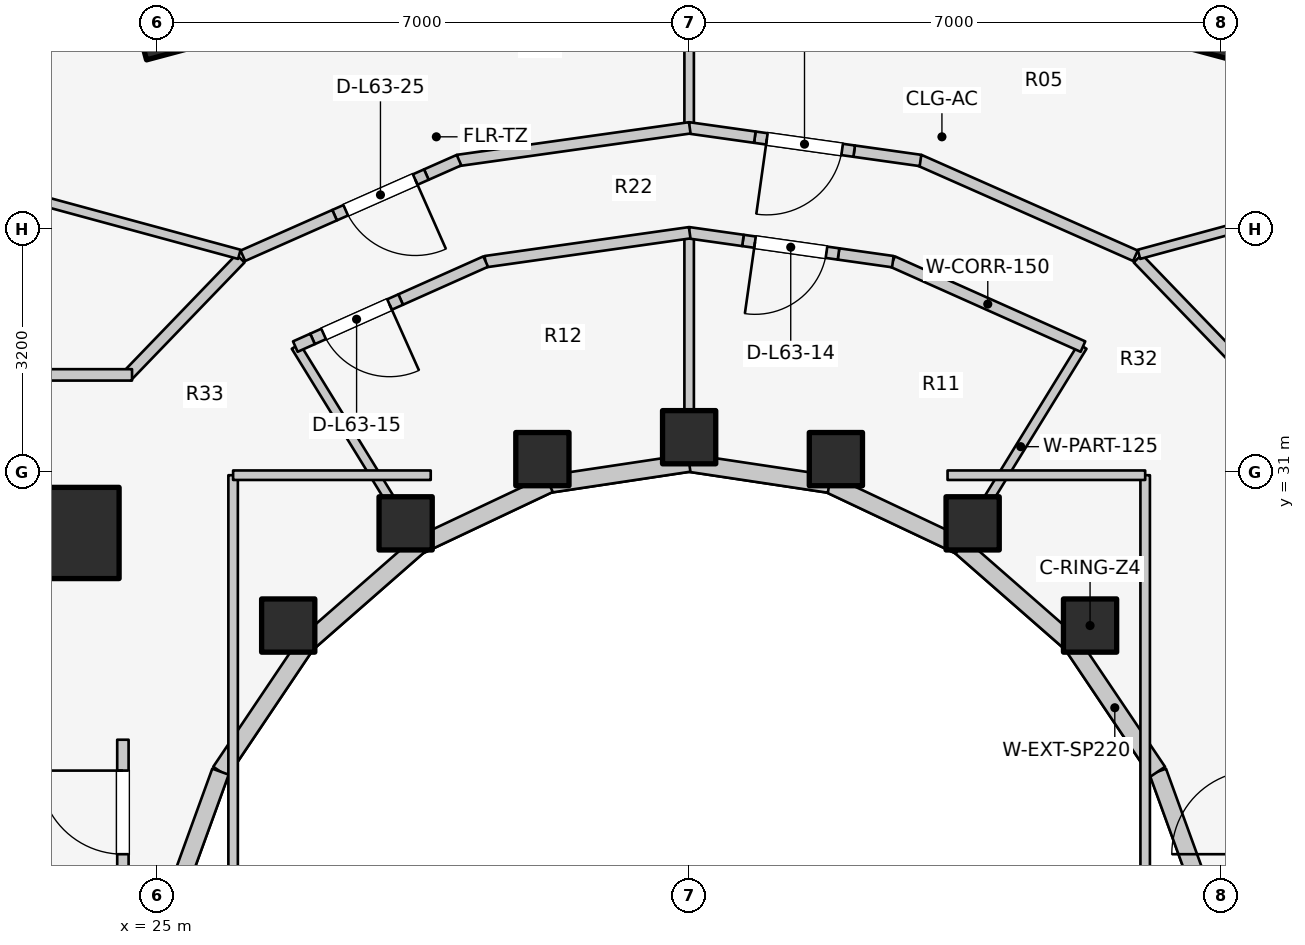
"""IFC4 building model, lengths in metres.
Left out: names, types, materials, properties, quantities, classifications, styles, units other than length and angle.
Written with IfcOpenShell. Run it as: python <this file> out.ifc"""

import sys

from ifc_helpers import new_model, si_unit, direction, frame, frame_2d, origin, origin_2d, place, context, subcontext, project, spatial, rectangle, extrude, element, fill, save


model = new_model("IFC4")
c1 = context("Model", 3, precision=1e-05, world=origin(), true_north=direction((0.0, 1.0)))
c2 = subcontext(c1, "Body", "Model", "MODEL_VIEW")
j1 = project(units=[si_unit("LENGTHUNIT", "METRE"), si_unit("PLANEANGLEUNIT", "RADIAN")], contexts=[c1])
p1 = place(None, origin())
s1 = spatial("IfcSite", under=j1, at=p1, CompositionType="ELEMENT")
p2 = place(p1, origin())
s2 = spatial("IfcBuilding", under=s1, at=p2, CompositionType="ELEMENT")
p3 = place(p2, frame((0.0, 0.0, 207.8)))
s3 = spatial("IfcBuildingStorey", under=s2, at=p3, CompositionType="ELEMENT", Elevation=207.8)
p4 = place(p3, frame((19.65, 30.35, 0.0), z_axis=(0.0, 0.0, 1.0), x_axis=(1.0, 0.0, 0.0)))
e1 = element("IfcWall", 1, at=p4, inside=s3, PredefinedType="SHEAR", context=c2, shape_type="SweptSolid", body=[
    extrude(rectangle(XDim=4.5, YDim=0.55, at=frame_2d((2.25, 0.0))), origin(), (0.0, 0.0, 1.0), 3.1),
])
p5 = place(p3, frame((23.9, 30.2, 0.0), z_axis=(0.0, 0.0, 1.0), x_axis=(1.0, 0.0, 0.0)))
e2 = element("IfcColumn", 2, at=p5, inside=s3, PredefinedType="COLUMN", context=c2, shape_type="SweptSolid", body=[
    extrude(rectangle(XDim=1.2, YDim=1.2, at=origin_2d()), origin(), (0.0, 0.0, 1.0), 3.1),
])
for number, where, z_axis, x_axis in (
    (3, (37.275, 28.982, 0.0), (0.0, 0.0, 1.0), (1.0, 0.0, 0.0)),
    (4, (35.73, 30.327, 0.0), (0.0, 0.0, 1.0), (1.0, 0.0, 0.0)),
    (5, (33.931, 31.172, 0.0), (0.0, 0.0, 1.0), (1.0, 0.0, 0.0)),
):
    element("IfcColumn", number, at=place(p3, frame(where, z_axis=z_axis, x_axis=x_axis)), inside=s3, PredefinedType="COLUMN", context=c2, shape_type="SweptSolid", body=[
        extrude(rectangle(XDim=0.7, YDim=0.7, at=origin_2d()), origin(), (0.0, 0.0, 1.0), 3.1),
    ])
p6 = place(p3, frame((38.856, 36.914, 0.0), z_axis=(0.0, 0.0, 1.0), x_axis=(0.258819045103, 0.965925826289, 0.0)))
e6 = element("IfcColumn", 6, at=p6, inside=s3, PredefinedType="COLUMN", context=c2, shape_type="SweptSolid", body=[
    extrude(rectangle(XDim=0.8, YDim=0.8, at=origin_2d()), origin(), (0.0, 0.0, 1.0), 3.1),
])
for number, where, z_axis, x_axis in (
    (7, (32.0, 31.46, 0.0), (0.0, 0.0, 1.0), (1.0, 0.0, 0.0)),
    (8, (30.069, 31.172, 0.0), (0.0, 0.0, 1.0), (1.0, 0.0, 0.0)),
):
    element("IfcColumn", number, at=place(p3, frame(where, z_axis=z_axis, x_axis=x_axis)), inside=s3, PredefinedType="COLUMN", context=c2, shape_type="SweptSolid", body=[
        extrude(rectangle(XDim=0.7, YDim=0.7, at=origin_2d()), origin(), (0.0, 0.0, 1.0), 3.1),
    ])
p7 = place(p3, frame((25.144, 36.914, 0.0), z_axis=(0.0, 0.0, 1.0), x_axis=(-0.258819045103, 0.965925826289, 0.0)))
e9 = element("IfcColumn", 9, at=p7, inside=s3, PredefinedType="COLUMN", context=c2, shape_type="SweptSolid", body=[
    extrude(rectangle(XDim=0.8, YDim=0.8, at=origin_2d()), origin(), (0.0, 0.0, 1.0), 3.1),
])
for number, where, z_axis, x_axis in (
    (10, (28.27, 30.327, 0.0), (0.0, 0.0, 1.0), (1.0, 0.0, 0.0)),
    (11, (26.725, 28.982, 0.0), (0.0, 0.0, 1.0), (1.0, 0.0, 0.0)),
):
    element("IfcColumn", number, at=place(p3, frame(where, z_axis=z_axis, x_axis=x_axis)), inside=s3, PredefinedType="COLUMN", context=c2, shape_type="SweptSolid", body=[
        extrude(rectangle(XDim=0.7, YDim=0.7, at=origin_2d()), origin(), (0.0, 0.0, 1.0), 3.1),
    ])
p8 = place(p3, frame((38.877, 25.102, 0.0), z_axis=(0.0, 0.0, 1.0), x_axis=(-0.341423187295, 0.93990968033, 0.0)))
e12 = element("IfcWall", 12, at=p8, inside=s3, PredefinedType="STANDARD", context=c2, shape_type="SweptSolid", body=[
    extrude(rectangle(XDim=2.084, YDim=0.23, at=frame_2d((1.042, 0.0))), origin(), (0.0, 0.0, 1.0), 2.56),
])
p9 = place(p3, frame((38.166, 27.06, 0.0), z_axis=(0.0, 0.0, 1.0), x_axis=(-0.558197800898, 0.829707909492, 0.0)))
e13 = element("IfcWall", 13, at=p9, inside=s3, PredefinedType="STANDARD", context=c2, shape_type="SweptSolid", body=[
    extrude(rectangle(XDim=2.027, YDim=0.23, at=frame_2d((1.013, 0.0))), origin(), (0.0, 0.0, 1.0), 1.22),
])
p10 = place(p3, frame((37.035, 28.742, 0.0), z_axis=(0.0, 0.0, 1.0), x_axis=(-0.752576694707, 0.658504607869, 0.0)))
e14 = element("IfcWall", 14, at=p10, inside=s3, PredefinedType="STANDARD", context=c2, shape_type="SweptSolid", body=[
    extrude(rectangle(XDim=1.959, YDim=0.23, at=frame_2d((0.98, 0.0))), origin(), (0.0, 0.0, 1.0), 1.22),
])
p11 = place(p3, frame((35.56, 30.032, 0.0), z_axis=(0.0, 0.0, 1.0), x_axis=(-0.904179699603, 0.427152280606, 0.0)))
e15 = element("IfcWall", 15, at=p11, inside=s3, PredefinedType="STANDARD", context=c2, shape_type="SweptSolid", body=[
    extrude(rectangle(XDim=1.899, YDim=0.23, at=frame_2d((0.95, 0.0))), origin(), (0.0, 0.0, 1.0), 1.22),
])
for number, where, z_axis, x_axis in (
    (16, (33.843, 30.843, 0.0), (0.0, 0.0, 1.0), (-0.989, 0.149, 0.0)),
    (17, (32.0, 31.12, 0.0), (0.0, 0.0, 1.0), (-0.989, -0.149, 0.0)),
):
    element("IfcWall", number, at=place(p3, frame(where, z_axis=z_axis, x_axis=x_axis)), inside=s3, PredefinedType="STANDARD", context=c2, shape_type="SweptSolid", body=[
        extrude(rectangle(XDim=1.864, YDim=0.23, at=frame_2d((0.932, 0.0))), origin(), (0.0, 0.0, 1.0), 1.22),
    ])
p12 = place(p3, frame((30.157, 30.843, 0.0), z_axis=(0.0, 0.0, 1.0), x_axis=(-0.904179699603, -0.427152280606, 0.0)))
e18 = element("IfcWall", 18, at=p12, inside=s3, PredefinedType="STANDARD", context=c2, shape_type="SweptSolid", body=[
    extrude(rectangle(XDim=1.899, YDim=0.23, at=frame_2d((0.95, 0.0))), origin(), (0.0, 0.0, 1.0), 1.22),
])
p13 = place(p3, frame((28.44, 30.032, 0.0), z_axis=(0.0, 0.0, 1.0), x_axis=(-0.752576694707, -0.658504607869, 0.0)))
e19 = element("IfcWall", 19, at=p13, inside=s3, PredefinedType="STANDARD", context=c2, shape_type="SweptSolid", body=[
    extrude(rectangle(XDim=1.959, YDim=0.23, at=frame_2d((0.98, 0.0))), origin(), (0.0, 0.0, 1.0), 1.22),
])
p14 = place(p3, frame((26.965, 28.742, 0.0), z_axis=(0.0, 0.0, 1.0), x_axis=(-0.558197800898, -0.829707909492, 0.0)))
e20 = element("IfcWall", 20, at=p14, inside=s3, PredefinedType="STANDARD", context=c2, shape_type="SweptSolid", body=[
    extrude(rectangle(XDim=2.027, YDim=0.23, at=frame_2d((1.013, 0.0))), origin(), (0.0, 0.0, 1.0), 1.22),
])
p15 = place(p3, frame((25.834, 27.06, 0.0), z_axis=(0.0, 0.0, 1.0), x_axis=(-0.341423187295, -0.93990968033, 0.0)))
e21 = element("IfcWall", 21, at=p15, inside=s3, PredefinedType="STANDARD", context=c2, shape_type="SweptSolid", body=[
    extrude(rectangle(XDim=2.084, YDim=0.23, at=frame_2d((1.042, 0.0))), origin(), (0.0, 0.0, 1.0), 2.56),
])
p16 = place(p3, frame((24.55, 24.08, 0.0), z_axis=(0.0, 0.0, 1.0), x_axis=(0.0, 1.0, 0.0)))
e22 = element("IfcWall", 22, at=p16, inside=s3, PredefinedType="PARTITIONING", context=c2, shape_type="SweptSolid", body=[
    extrude(rectangle(XDim=3.4, YDim=0.15, at=frame_2d((1.7, 0.0))), origin(), (0.0, 0.0, 1.0), 2.575),
])
p17 = place(p16, frame((1.894, 0.0, 0.0)))
e23 = element("IfcOpeningElement", 23, at=p17, cuts=e22, PredefinedType="OPENING", context=c2, shape_type="SweptSolid", body=[
    extrude(rectangle(XDim=1.1, YDim=2.1, at=frame_2d((0.55, 1.05))), frame((0.0, 0.085, 0.0), z_axis=(0.0, -1.0, 0.0), x_axis=(1.0, 0.0, 0.0)), (0.0, 0.0, 1.0), 0.17),
])
p18 = place(p3, frame((35.55, 30.015, 0.0), z_axis=(0.0, 0.0, 1.0), x_axis=(0.523992004803, 0.851723182086, 0.0)))
e24 = element("IfcWall", 24, at=p18, inside=s3, PredefinedType="PARTITIONING", context=c2, shape_type="SweptSolid", body=[
    extrude(rectangle(XDim=3.101, YDim=0.125, at=frame_2d((1.551, 0.0))), origin(), (0.0, 0.0, 1.0), 2.096),
])
p19 = place(p3, frame((32.0, 31.1, 0.0), z_axis=(0.0, 0.0, 1.0), x_axis=(0.0, 1.0, 0.0)))
e25 = element("IfcWall", 25, at=p19, inside=s3, PredefinedType="PARTITIONING", context=c2, shape_type="SweptSolid", body=[
    extrude(rectangle(XDim=3.05, YDim=0.125, at=frame_2d((1.525, 0.0))), origin(), (0.0, 0.0, 1.0), 2.096),
])
p20 = place(p3, frame((28.45, 30.015, 0.0), z_axis=(0.0, 0.0, 1.0), x_axis=(-0.523992004803, 0.851723182086, 0.0)))
e26 = element("IfcWall", 26, at=p20, inside=s3, PredefinedType="PARTITIONING", context=c2, shape_type="SweptSolid", body=[
    extrude(rectangle(XDim=3.101, YDim=0.125, at=frame_2d((1.551, 0.0))), origin(), (0.0, 0.0, 1.0), 2.096),
])
p21 = place(p3, frame((37.181, 32.652, 0.0), z_axis=(0.0, 0.0, 1.0), x_axis=(-0.913120130558, 0.407690602257, 0.0)))
e27 = element("IfcWall", 27, at=p21, inside=s3, PredefinedType="PARTITIONING", context=c2, shape_type="SweptSolid", body=[
    extrude(rectangle(XDim=2.743, YDim=0.15, at=frame_2d((1.371, 0.0))), origin(), (0.0, 0.0, 1.0), 2.096),
])
p22 = place(p3, frame((34.68, 33.77, 0.0), z_axis=(0.0, 0.0, 1.0), x_axis=(-0.990111099965, 0.140285458001, 0.0)))
e28 = element("IfcWall", 28, at=p22, inside=s3, PredefinedType="PARTITIONING", context=c2, shape_type="SweptSolid", body=[
    extrude(rectangle(XDim=0.722, YDim=0.15, at=frame_2d((0.361, 0.0))), origin(), (0.0, 0.0, 1.0), 2.575),
])
p23 = place(p3, frame((33.965, 33.871, 0.0), z_axis=(0.0, 0.0, 1.0), x_axis=(-0.990129408, 0.14015618222, 0.0)))
e29 = element("IfcWall", 29, at=p23, inside=s3, PredefinedType="PARTITIONING", context=c2, shape_type="SweptSolid", body=[
    extrude(rectangle(XDim=1.27, YDim=0.15, at=frame_2d((0.635, 0.0))), origin(), (0.0, 0.0, 1.0), 2.575),
])
p24 = place(p23, frame((0.16, 0.0, 0.0)))
e30 = element("IfcOpeningElement", 30, at=p24, cuts=e29, PredefinedType="OPENING", context=c2, shape_type="SweptSolid", body=[
    extrude(rectangle(XDim=0.95, YDim=2.1, at=frame_2d((0.475, 1.05))), frame((0.0, 0.085, 0.0), z_axis=(0.0, -1.0, 0.0), x_axis=(1.0, 0.0, 0.0)), (0.0, 0.0, 1.0), 0.17),
])
p25 = place(p3, frame((32.708, 34.049, 0.0), z_axis=(0.0, 0.0, 1.0), x_axis=(-0.990157999489, 0.139954049774, 0.0)))
e31 = element("IfcWall", 31, at=p25, inside=s3, PredefinedType="PARTITIONING", context=c2, shape_type="SweptSolid", body=[
    extrude(rectangle(XDim=0.722, YDim=0.15, at=frame_2d((0.361, 0.0))), origin(), (0.0, 0.0, 1.0), 2.096),
])
p26 = place(p3, frame((32.007, 34.15, 0.0), z_axis=(0.0, 0.0, 1.0), x_axis=(-0.990132151456, -0.140136799779, 0.0)))
e32 = element("IfcWall", 32, at=p26, inside=s3, PredefinedType="PARTITIONING", context=c2, shape_type="SweptSolid", body=[
    extrude(rectangle(XDim=2.714, YDim=0.15, at=frame_2d((1.357, 0.0))), origin(), (0.0, 0.0, 1.0), 2.096),
])
p27 = place(p3, frame((29.323, 33.771, 0.0), z_axis=(0.0, 0.0, 1.0), x_axis=(-0.913103438245, -0.40772798661, 0.0)))
e33 = element("IfcWall", 33, at=p27, inside=s3, PredefinedType="PARTITIONING", context=c2, shape_type="SweptSolid", body=[
    extrude(rectangle(XDim=1.225, YDim=0.15, at=frame_2d((0.613, 0.0))), origin(), (0.0, 0.0, 1.0), 2.096),
])
p28 = place(p3, frame((28.204, 33.271, 0.0), z_axis=(0.0, 0.0, 1.0), x_axis=(-0.913104656548, -0.407725258219, 0.0)))
e34 = element("IfcWall", 34, at=p28, inside=s3, PredefinedType="PARTITIONING", context=c2, shape_type="SweptSolid", body=[
    extrude(rectangle(XDim=1.27, YDim=0.15, at=frame_2d((0.635, 0.0))), origin(), (0.0, 0.0, 1.0), 2.16),
])
p29 = place(p28, frame((0.16, 0.0, 0.0)))
e35 = element("IfcOpeningElement", 35, at=p29, cuts=e34, PredefinedType="OPENING", context=c2, shape_type="SweptSolid", body=[
    extrude(rectangle(XDim=0.95, YDim=2.1, at=frame_2d((0.475, 1.05))), frame((0.0, 0.085, 0.0), z_axis=(0.0, -1.0, 0.0), x_axis=(1.0, 0.0, 0.0)), (0.0, 0.0, 1.0), 0.17),
])
p30 = place(p3, frame((27.045, 32.753, 0.0), z_axis=(0.0, 0.0, 1.0), x_axis=(-0.913282054518, -0.407327741378, 0.0)))
e36 = element("IfcWall", 36, at=p30, inside=s3, PredefinedType="PARTITIONING", context=c2, shape_type="SweptSolid", body=[
    extrude(rectangle(XDim=0.248, YDim=0.15, at=frame_2d((0.124, 0.0))), origin(), (0.0, 0.0, 1.0), 2.575),
])
p31 = place(p3, frame((26.0, 25.8, 0.0), z_axis=(0.0, 0.0, 1.0), x_axis=(0.0, 1.0, 0.0)))
e37 = element("IfcWall", 37, at=p31, inside=s3, PredefinedType="PARTITIONING", context=c2, shape_type="SweptSolid", body=[
    extrude(rectangle(XDim=5.16, YDim=0.125, at=frame_2d((2.58, 0.0))), origin(), (0.0, 0.0, 1.0), 1.952),
])
p32 = place(p3, frame((26.0, 30.96, 0.0), z_axis=(0.0, 0.0, 1.0), x_axis=(1.0, 0.0, 0.0)))
e38 = element("IfcWall", 38, at=p32, inside=s3, PredefinedType="PARTITIONING", context=c2, shape_type="SweptSolid", body=[
    extrude(rectangle(XDim=2.6, YDim=0.125, at=frame_2d((1.3, 0.0))), origin(), (0.0, 0.0, 1.0), 2.096),
])
p33 = place(p3, frame((38.0, 25.8, 0.0), z_axis=(0.0, 0.0, 1.0), x_axis=(0.0, 1.0, 0.0)))
e39 = element("IfcWall", 39, at=p33, inside=s3, PredefinedType="PARTITIONING", context=c2, shape_type="SweptSolid", body=[
    extrude(rectangle(XDim=5.16, YDim=0.125, at=frame_2d((2.58, 0.0))), origin(), (0.0, 0.0, 1.0), 1.952),
])
p34 = place(p3, frame((35.4, 30.96, 0.0), z_axis=(0.0, 0.0, 1.0), x_axis=(1.0, 0.0, 0.0)))
e40 = element("IfcWall", 40, at=p34, inside=s3, PredefinedType="PARTITIONING", context=c2, shape_type="SweptSolid", body=[
    extrude(rectangle(XDim=2.6, YDim=0.125, at=frame_2d((1.3, 0.0))), origin(), (0.0, 0.0, 1.0), 2.096),
])
for number, where, z_axis, x_axis in (
    (41, (37.903, 33.812, 0.0), (0.0, 0.0, 1.0), (0.694, -0.72, 0.0)),
    (42, (26.097, 33.812, 0.0), (0.0, 0.0, 1.0), (-0.694, -0.72, 0.0)),
):
    element("IfcWall", number, at=place(p3, frame(where, z_axis=z_axis, x_axis=x_axis)), inside=s3, PredefinedType="PARTITIONING", context=c2, shape_type="SweptSolid", body=[
        extrude(rectangle(XDim=2.158, YDim=0.15, at=frame_2d((1.079, 0.0))), origin(), (0.0, 0.0, 1.0), 2.096),
    ])
p35 = place(p3, frame((19.51, 32.28, 0.0), z_axis=(0.0, 0.0, 1.0), x_axis=(1.0, 0.0, 0.0)))
e43 = element("IfcWall", 43, at=p35, inside=s3, PredefinedType="PARTITIONING", context=c2, shape_type="SweptSolid", body=[
    extrude(rectangle(XDim=5.16, YDim=0.15, at=frame_2d((2.58, 0.0))), origin(), (0.0, 0.0, 1.0), 2.096),
])
p36 = place(p3, frame((37.918, 33.866, 0.0), z_axis=(0.0, 0.0, 1.0), x_axis=(0.965109390289, 0.261847025523, 0.0)))
e44 = element("IfcWall", 44, at=p36, inside=s3, PredefinedType="PARTITIONING", context=c2, shape_type="SweptSolid", body=[
    extrude(rectangle(XDim=5.644, YDim=0.125, at=frame_2d((2.822, 0.0))), origin(), (0.0, 0.0, 1.0), 1.22),
])
p37 = place(p3, frame((32.0, 35.585, 0.0), z_axis=(0.0, 0.0, 1.0), x_axis=(0.0, 1.0, 0.0)))
e45 = element("IfcWall", 45, at=p37, inside=s3, PredefinedType="PARTITIONING", context=c2, shape_type="SweptSolid", body=[
    extrude(rectangle(XDim=1.315, YDim=0.125, at=frame_2d((0.657, 0.0))), origin(), (0.0, 0.0, 1.0), 1.22),
])
p38 = place(p3, frame((26.082, 33.866, 0.0), z_axis=(0.0, 0.0, 1.0), x_axis=(-0.965109390289, 0.261847025523, 0.0)))
e46 = element("IfcWall", 46, at=p38, inside=s3, PredefinedType="PARTITIONING", context=c2, shape_type="SweptSolid", body=[
    extrude(rectangle(XDim=5.644, YDim=0.125, at=frame_2d((2.822, 0.0))), origin(), (0.0, 0.0, 1.0), 1.22),
])
p39 = place(p3, frame((37.872, 33.847, 0.0), z_axis=(0.0, 0.0, 1.0), x_axis=(-0.914490094652, 0.40460828808, 0.0)))
e47 = element("IfcWall", 47, at=p39, inside=s3, PredefinedType="PARTITIONING", context=c2, shape_type="SweptSolid", body=[
    extrude(rectangle(XDim=3.11, YDim=0.15, at=frame_2d((1.555, 0.0))), origin(), (0.0, 0.0, 1.0), 2.096),
])
p40 = place(p3, frame((35.044, 35.101, 0.0), z_axis=(0.0, 0.0, 1.0), x_axis=(-0.990279252054, 0.139093504346, 0.0)))
e48 = element("IfcWall", 48, at=p40, inside=s3, PredefinedType="PARTITIONING", context=c2, shape_type="SweptSolid", body=[
    extrude(rectangle(XDim=0.881, YDim=0.15, at=frame_2d((0.44, 0.0))), origin(), (0.0, 0.0, 1.0), 2.575),
])
p41 = place(p3, frame((34.171, 35.223, 0.0), z_axis=(0.0, 0.0, 1.0), x_axis=(-0.990254187593, 0.139271834751, 0.0)))
e49 = element("IfcWall", 49, at=p41, inside=s3, PredefinedType="PARTITIONING", context=c2, shape_type="SweptSolid", body=[
    extrude(rectangle(XDim=1.32, YDim=0.15, at=frame_2d((0.66, 0.0))), origin(), (0.0, 0.0, 1.0), 2.575),
])
p42 = place(p41, frame((0.16, 0.0, 0.0)))
e50 = element("IfcOpeningElement", 50, at=p42, cuts=e49, PredefinedType="OPENING", context=c2, shape_type="SweptSolid", body=[
    extrude(rectangle(XDim=1.0, YDim=2.1, at=frame_2d((0.5, 1.05))), frame((0.0, 0.085, 0.0), z_axis=(0.0, -1.0, 0.0), x_axis=(1.0, 0.0, 0.0)), (0.0, 0.0, 1.0), 0.17),
])
p43 = place(p3, frame((32.864, 35.407, 0.0), z_axis=(0.0, 0.0, 1.0), x_axis=(-0.990241051041, 0.13936520668, 0.0)))
e51 = element("IfcWall", 51, at=p43, inside=s3, PredefinedType="PARTITIONING", context=c2, shape_type="SweptSolid", body=[
    extrude(rectangle(XDim=0.881, YDim=0.15, at=frame_2d((0.44, 0.0))), origin(), (0.0, 0.0, 1.0), 2.096),
])
p44 = place(p3, frame((32.008, 35.53, 0.0), z_axis=(0.0, 0.0, 1.0), x_axis=(-0.990257602807, -0.139247549651, 0.0)))
e52 = element("IfcWall", 52, at=p44, inside=s3, PredefinedType="PARTITIONING", context=c2, shape_type="SweptSolid", body=[
    extrude(rectangle(XDim=3.082, YDim=0.15, at=frame_2d((1.541, 0.0))), origin(), (0.0, 0.0, 1.0), 2.096),
])
p45 = place(p3, frame((28.972, 35.105, 0.0), z_axis=(0.0, 0.0, 1.0), x_axis=(-0.914431812955, -0.404739989939, 0.0)))
e53 = element("IfcWall", 53, at=p45, inside=s3, PredefinedType="PARTITIONING", context=c2, shape_type="SweptSolid", body=[
    extrude(rectangle(XDim=0.47, YDim=0.15, at=frame_2d((0.235, 0.0))), origin(), (0.0, 0.0, 1.0), 2.575),
])
p46 = place(p3, frame((28.542, 34.915, 0.0), z_axis=(0.0, 0.0, 1.0), x_axis=(-0.914519545761, -0.404541716541, 0.0)))
e54 = element("IfcWall", 54, at=p46, inside=s3, PredefinedType="PARTITIONING", context=c2, shape_type="SweptSolid", body=[
    extrude(rectangle(XDim=1.32, YDim=0.15, at=frame_2d((0.66, 0.0))), origin(), (0.0, 0.0, 1.0), 2.16),
])
p47 = place(p46, frame((0.16, 0.0, 0.0)))
e55 = element("IfcOpeningElement", 55, at=p47, cuts=e54, PredefinedType="OPENING", context=c2, shape_type="SweptSolid", body=[
    extrude(rectangle(XDim=1.0, YDim=2.1, at=frame_2d((0.5, 1.05))), frame((0.0, 0.085, 0.0), z_axis=(0.0, -1.0, 0.0), x_axis=(1.0, 0.0, 0.0)), (0.0, 0.0, 1.0), 0.17),
])
p48 = place(p3, frame((27.335, 34.381, 0.0), z_axis=(0.0, 0.0, 1.0), x_axis=(-0.914481389177, -0.404627963503, 0.0)))
e56 = element("IfcWall", 56, at=p48, inside=s3, PredefinedType="PARTITIONING", context=c2, shape_type="SweptSolid", body=[
    extrude(rectangle(XDim=1.32, YDim=0.15, at=frame_2d((0.66, 0.0))), origin(), (0.0, 0.0, 1.0), 2.096),
])
p49 = place(p17, origin())
e57 = element("IfcDoor", 57, at=p49, inside=s3, OperationType="SINGLE_SWING_RIGHT", PredefinedType="DOOR", context=c2, shape_type="SweptSolid", body=[
    extrude(rectangle(XDim=1.1, YDim=2.1, at=frame_2d((0.55, 1.05))), frame((0.0, 0.025, 0.0), z_axis=(0.0, -1.0, 0.0), x_axis=(1.0, 0.0, 0.0)), (0.0, 0.0, 1.0), 0.05),
])
fill(e23, e57)
p50 = place(p24, origin())
e58 = element("IfcDoor", 58, at=p50, inside=s3, OperationType="SINGLE_SWING_RIGHT", PredefinedType="DOOR", context=c2, shape_type="SweptSolid", body=[
    extrude(rectangle(XDim=0.95, YDim=2.1, at=frame_2d((0.475, 1.05))), frame((0.0, 0.025, 0.0), z_axis=(0.0, -1.0, 0.0), x_axis=(1.0, 0.0, 0.0)), (0.0, 0.0, 1.0), 0.05),
])
fill(e30, e58)
p51 = place(p29, origin())
e59 = element("IfcDoor", 59, at=p51, inside=s3, OperationType="SINGLE_SWING_LEFT", PredefinedType="DOOR", context=c2, shape_type="SweptSolid", body=[
    extrude(rectangle(XDim=0.95, YDim=2.1, at=frame_2d((0.475, 1.05))), frame((0.0, 0.025, 0.0), z_axis=(0.0, -1.0, 0.0), x_axis=(1.0, 0.0, 0.0)), (0.0, 0.0, 1.0), 0.05),
])
fill(e35, e59)
p52 = place(p42, origin())
e60 = element("IfcDoor", 60, at=p52, inside=s3, OperationType="SINGLE_SWING_RIGHT", PredefinedType="DOOR", context=c2, shape_type="SweptSolid", body=[
    extrude(rectangle(XDim=1.0, YDim=2.1, at=frame_2d((0.5, 1.05))), frame((0.0, 0.025, 0.0), z_axis=(0.0, -1.0, 0.0), x_axis=(1.0, 0.0, 0.0)), (0.0, 0.0, 1.0), 0.05),
])
fill(e50, e60)
p53 = place(p47, origin())
e61 = element("IfcDoor", 61, at=p53, inside=s3, OperationType="SINGLE_SWING_LEFT", PredefinedType="DOOR", context=c2, shape_type="SweptSolid", body=[
    extrude(rectangle(XDim=1.0, YDim=2.1, at=frame_2d((0.5, 1.05))), frame((0.0, 0.025, 0.0), z_axis=(0.0, -1.0, 0.0), x_axis=(1.0, 0.0, 0.0)), (0.0, 0.0, 1.0), 0.05),
])
fill(e55, e61)
save(model, sys.argv[1])
